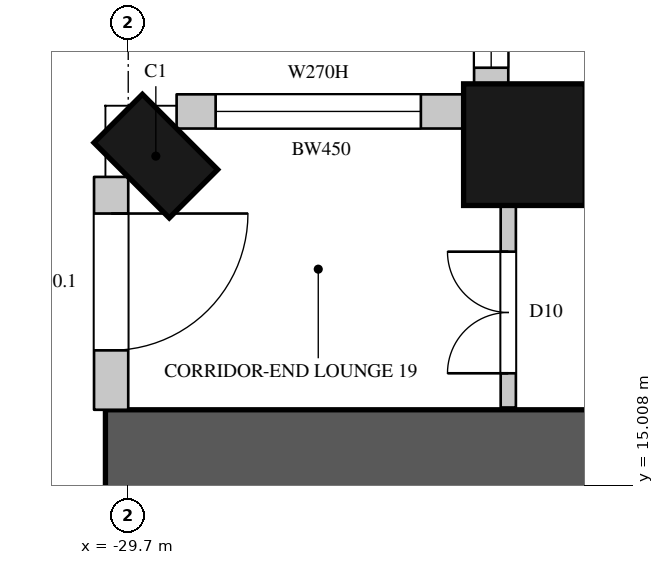
"""IFC4 building model, lengths in metres.
Left out: names, types, materials, properties, quantities, classifications, styles, units other than length and angle.
Written with IfcOpenShell. Run it as: python <this file> out.ifc"""

import sys

from ifc_helpers import new_model, si_unit, direction, frame, frame_2d, origin, origin_2d, place, context, subcontext, project, spatial, rectangle, circle, extrude, element, fill, save


model = new_model("IFC4")
c1 = context("Model", 3, precision=1e-05, world=origin(), true_north=direction((0.0, 1.0)))
c2 = subcontext(c1, "Body", "Model", "MODEL_VIEW")
j1 = project(units=[si_unit("LENGTHUNIT", "METRE"), si_unit("PLANEANGLEUNIT", "RADIAN")], contexts=[c1])
p1 = place(None, origin())
s1 = spatial("IfcSite", under=j1, at=p1, CompositionType="ELEMENT")
p2 = place(p1, origin())
s2 = spatial("IfcBuilding", under=s1, at=p2, CompositionType="ELEMENT")
p3 = place(p2, frame((0.0, 0.0, 98.7)))
s3 = spatial("IfcBuildingStorey", under=s2, at=p3, CompositionType="ELEMENT", Elevation=98.7)
p4 = place(p3, frame((-29.337, 19.337, 0.0), z_axis=(0.0, 0.0, 1.0), x_axis=(-0.707106781187, -0.707106781187, 0.0)))
e1 = element("IfcColumn", 1, at=p4, inside=s3, PredefinedType="COLUMN", context=c2, shape_type="SweptSolid", body=[
    extrude(rectangle(XDim=0.9, YDim=1.4, at=origin_2d()), origin(), (0.0, 0.0, 1.0), 3.6),
])
p5 = place(p3, frame((-24.488, 19.488, 0.0), z_axis=(0.0, 0.0, 1.0), x_axis=(1.0, 0.0, 0.0)))
e2 = element("IfcColumn", 2, at=p5, inside=s3, PredefinedType="COLUMN", context=c2, shape_type="SweptSolid", body=[
    extrude(circle(Radius=0.8, at=origin_2d()), origin(), (0.0, 0.0, 1.0), 3.6),
])
p6 = place(p3, frame((-29.925, 19.064, 0.0), z_axis=(0.0, 0.0, 1.0), x_axis=(0.0, -1.0, 0.0)))
e3 = element("IfcWall", 3, at=p6, inside=s3, PredefinedType="SOLIDWALL", context=c2, shape_type="SweptSolid", body=[
    extrude(rectangle(XDim=3.064, YDim=0.45, at=frame_2d((1.532, 0.0))), origin(), (0.0, 0.0, 1.0), 3.3),
])
p7 = place(p6, frame((0.482, 0.0, 0.0)))
e4 = element("IfcOpeningElement", 4, at=p7, cuts=e3, PredefinedType="OPENING", context=c2, shape_type="SweptSolid", body=[
    extrude(rectangle(XDim=1.8, YDim=2.4, at=frame_2d((0.9, 1.2))), frame((0.0, 0.235, 0.0), z_axis=(0.0, -1.0, 0.0), x_axis=(1.0, 0.0, 0.0)), (0.0, 0.0, 1.0), 0.47),
])
p8 = place(p3, frame((-24.925, 22.05, 0.0), z_axis=(0.0, 0.0, 1.0), x_axis=(0.0, -1.0, 0.0)))
e5 = element("IfcWall", 5, at=p8, inside=s3, PredefinedType="SOLIDWALL", context=c2, shape_type="SweptSolid", body=[
    extrude(rectangle(XDim=1.792, YDim=0.45, at=frame_2d((0.896, 0.0))), origin(), (0.0, 0.0, 1.0), 3.3),
])
p9 = place(p8, frame((0.35, 0.0, 1.05)))
e6 = element("IfcOpeningElement", 6, at=p9, cuts=e5, PredefinedType="OPENING", context=c2, shape_type="SweptSolid", body=[
    extrude(rectangle(XDim=1.2, YDim=2.0, at=frame_2d((0.6, 1.0))), frame((0.0, 0.235, 0.0), z_axis=(0.0, -1.0, 0.0), x_axis=(1.0, 0.0, 0.0)), (0.0, 0.0, 1.0), 0.47),
])
p10 = place(p3, frame((-25.259, 19.925, 0.0), z_axis=(0.0, 0.0, 1.0), x_axis=(-1.0, 0.0, 0.0)))
e7 = element("IfcWall", 7, at=p10, inside=s3, PredefinedType="SOLIDWALL", context=c2, shape_type="SweptSolid", body=[
    extrude(rectangle(XDim=3.805, YDim=0.45, at=frame_2d((1.903, 0.0))), origin(), (0.0, 0.0, 1.0), 3.3),
])
p11 = place(p10, frame((0.592, 0.0, 1.05)))
e8 = element("IfcOpeningElement", 8, at=p11, cuts=e7, PredefinedType="OPENING", context=c2, shape_type="SweptSolid", body=[
    extrude(rectangle(XDim=2.7, YDim=2.0, at=frame_2d((1.35, 1.0))), frame((0.0, 0.235, 0.0), z_axis=(0.0, -1.0, 0.0), x_axis=(1.0, 0.0, 0.0)), (0.0, 0.0, 1.0), 0.47),
])
p12 = place(p3, frame((-30.0, 15.4, 0.0), z_axis=(0.0, 0.0, 1.0), x_axis=(1.0, 0.0, 0.0)))
e9 = element("IfcWall", 9, at=p12, inside=s3, PredefinedType="SHEAR", context=c2, shape_type="SweptSolid", body=[
    extrude(rectangle(XDim=16.0, YDim=1.2, at=frame_2d((8.0, 0.0))), origin(), (0.0, 0.0, 1.0), 3.6),
])
p13 = place(p12, frame((13.4, 0.0, 0.0)))
e10 = element("IfcOpeningElement", 10, at=p13, cuts=e9, PredefinedType="OPENING", context=c2, shape_type="SweptSolid", body=[
    extrude(rectangle(XDim=1.5, YDim=2.4, at=frame_2d((0.75, 1.2))), frame((0.0, 0.61, 0.0), z_axis=(0.0, -1.0, 0.0), x_axis=(1.0, 0.0, 0.0)), (0.0, 0.0, 1.0), 1.22),
])
p14 = place(p3, frame((-24.7, 16.03, 0.0), z_axis=(0.0, 0.0, 1.0), x_axis=(0.0, 1.0, 0.0)))
e11 = element("IfcWall", 11, at=p14, inside=s3, PredefinedType="PARTITIONING", context=c2, shape_type="SweptSolid", body=[
    extrude(rectangle(XDim=2.67, YDim=0.2, at=frame_2d((1.335, 0.0))), origin(), (0.0, 0.0, 1.0), 3.3),
])
p15 = place(p14, frame((0.45, 0.0, 0.0)))
e12 = element("IfcOpeningElement", 12, at=p15, cuts=e11, PredefinedType="OPENING", context=c2, shape_type="SweptSolid", body=[
    extrude(rectangle(XDim=1.6, YDim=2.4, at=frame_2d((0.8, 1.2))), frame((0.0, 0.11, 0.0), z_axis=(0.0, -1.0, 0.0), x_axis=(1.0, 0.0, 0.0)), (0.0, 0.0, 1.0), 0.22),
])
p16 = place(p3, frame((-23.765, 19.9, 0.0), z_axis=(0.0, 0.0, 1.0), x_axis=(1.0, 0.0, 0.0)))
e13 = element("IfcWall", 13, at=p16, inside=s3, PredefinedType="PARTITIONING", context=c2, shape_type="SweptSolid", body=[
    extrude(rectangle(XDim=41.549, YDim=0.2, at=frame_2d((20.774, 0.0))), origin(), (0.0, 0.0, 1.0), 3.3),
])
p17 = place(p16, frame((14.2, 0.0, 0.0)))
e14 = element("IfcOpeningElement", 14, at=p17, cuts=e13, PredefinedType="OPENING", context=c2, shape_type="SweptSolid", body=[
    extrude(rectangle(XDim=0.9, YDim=2.2, at=frame_2d((0.45, 1.1))), frame((0.0, 0.11, 0.0), z_axis=(0.0, -1.0, 0.0), x_axis=(1.0, 0.0, 0.0)), (0.0, 0.0, 1.0), 0.22),
])
p18 = place(p16, frame((27.05, 0.0, 0.0)))
e15 = element("IfcOpeningElement", 15, at=p18, cuts=e13, PredefinedType="OPENING", context=c2, shape_type="SweptSolid", body=[
    extrude(rectangle(XDim=0.9, YDim=2.2, at=frame_2d((0.45, 1.1))), frame((0.0, 0.11, 0.0), z_axis=(0.0, -1.0, 0.0), x_axis=(1.0, 0.0, 0.0)), (0.0, 0.0, 1.0), 0.22),
])
p19 = place(p16, frame((0.75, 0.0, 0.0)))
e16 = element("IfcOpeningElement", 16, at=p19, cuts=e13, PredefinedType="OPENING", context=c2, shape_type="SweptSolid", body=[
    extrude(rectangle(XDim=1.1, YDim=2.4, at=frame_2d((0.55, 1.2))), frame((0.0, 0.11, 0.0), z_axis=(0.0, -1.0, 0.0), x_axis=(1.0, 0.0, 0.0)), (0.0, 0.0, 1.0), 0.22),
])
p20 = place(p16, frame((23.15, 0.0, 0.0)))
e17 = element("IfcOpeningElement", 17, at=p20, cuts=e13, PredefinedType="OPENING", context=c2, shape_type="SweptSolid", body=[
    extrude(rectangle(XDim=0.95, YDim=2.2, at=frame_2d((0.475, 1.1))), frame((0.0, 0.11, 0.0), z_axis=(0.0, -1.0, 0.0), x_axis=(1.0, 0.0, 0.0)), (0.0, 0.0, 1.0), 0.22),
])
p21 = place(p16, frame((34.95, 0.0, 0.0)))
e18 = element("IfcOpeningElement", 18, at=p21, cuts=e13, PredefinedType="OPENING", context=c2, shape_type="SweptSolid", body=[
    extrude(rectangle(XDim=0.95, YDim=2.2, at=frame_2d((0.475, 1.1))), frame((0.0, 0.11, 0.0), z_axis=(0.0, -1.0, 0.0), x_axis=(1.0, 0.0, 0.0)), (0.0, 0.0, 1.0), 0.22),
])
p22 = place(p7, origin())
e19 = element("IfcDoor", 19, at=p22, inside=s3, OperationType="SLIDING_TO_LEFT", PredefinedType="DOOR", context=c2, shape_type="SweptSolid", body=[
    extrude(rectangle(XDim=1.8, YDim=2.4, at=frame_2d((0.9, 1.2))), frame((0.0, 0.13, 0.0), z_axis=(0.0, -1.0, 0.0), x_axis=(1.0, 0.0, 0.0)), (0.0, 0.0, 1.0), 0.05),
])
fill(e4, e19)
p23 = place(p9, origin())
e20 = element("IfcWindow", 20, at=p23, inside=s3, PartitioningType="SINGLE_PANEL", PredefinedType="WINDOW", context=c2, shape_type="SweptSolid", body=[
    extrude(rectangle(XDim=1.2, YDim=2.0, at=frame_2d((0.6, 1.0))), frame((0.0, 0.135, 0.0), z_axis=(0.0, -1.0, 0.0), x_axis=(1.0, 0.0, 0.0)), (0.0, 0.0, 1.0), 0.06),
])
fill(e6, e20)
p24 = place(p11, origin())
e21 = element("IfcWindow", 21, at=p24, inside=s3, PartitioningType="SINGLE_PANEL", PredefinedType="WINDOW", context=c2, shape_type="SweptSolid", body=[
    extrude(rectangle(XDim=2.7, YDim=2.0, at=frame_2d((1.35, 1.0))), frame((0.0, 0.135, 0.0), z_axis=(0.0, -1.0, 0.0), x_axis=(1.0, 0.0, 0.0)), (0.0, 0.0, 1.0), 0.06),
])
fill(e8, e21)
p25 = place(p15, origin())
e22 = element("IfcDoor", 22, at=p25, inside=s3, OperationType="DOUBLE_DOOR_SINGLE_SWING", PredefinedType="DOOR", context=c2, shape_type="SweptSolid", body=[
    extrude(rectangle(XDim=1.6, YDim=2.4, at=frame_2d((0.8, 1.2))), frame((0.0, 0.025, 0.0), z_axis=(0.0, -1.0, 0.0), x_axis=(1.0, 0.0, 0.0)), (0.0, 0.0, 1.0), 0.05),
])
fill(e12, e22)
save(model, sys.argv[1])
